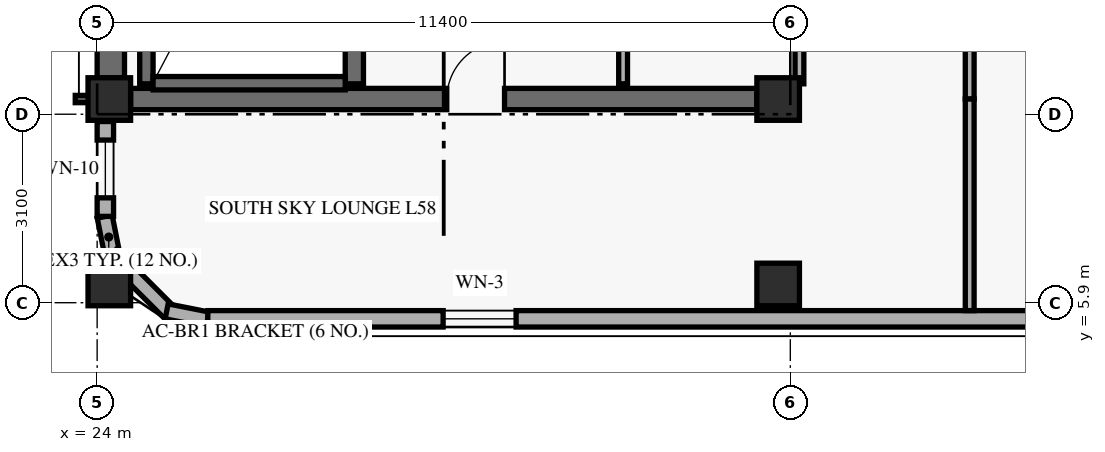
"""IFC4 building model, lengths in metres.
Left out: names, types, materials, properties, quantities, classifications, styles, units other than length and angle.
Written with IfcOpenShell. Run it as: python <this file> out.ifc"""

import sys

from ifc_helpers import new_model, si_unit, direction, frame, frame_2d, origin, origin_2d, place, context, subcontext, project, spatial, rectangle, extrude, element, fill, save


model = new_model("IFC4")
c1 = context("Model", 3, precision=1e-05, world=origin(), true_north=direction((0.0, 1.0)))
c2 = subcontext(c1, "Body", "Model", "MODEL_VIEW")
j1 = project(units=[si_unit("LENGTHUNIT", "METRE"), si_unit("PLANEANGLEUNIT", "RADIAN")], contexts=[c1])
p1 = place(None, origin())
s1 = spatial("IfcSite", under=j1, at=p1, CompositionType="ELEMENT")
p2 = place(p1, origin())
s2 = spatial("IfcBuilding", under=s1, at=p2, CompositionType="ELEMENT")
p3 = place(p2, frame((0.0, 0.0, 223.8)))
s3 = spatial("IfcBuildingStorey", under=s2, at=p3, CompositionType="ELEMENT", Elevation=223.8)
p4 = place(p3, frame((24.225, 9.6, 0.0), z_axis=(0.0, 0.0, 1.0), x_axis=(0.0, 1.0, 0.0)))
e1 = element("IfcWall", 1, at=p4, inside=s3, PredefinedType="SHEAR", context=c2, shape_type="SweptSolid", body=[
    extrude(rectangle(XDim=7.6, YDim=0.45, at=frame_2d((3.8, 0.0))), origin(), (0.0, 0.0, 1.0), 2.821),
])
p5 = place(p3, frame((24.55, 9.25, 0.0), z_axis=(0.0, 0.0, 1.0), x_axis=(1.0, 0.0, 0.0)))
e2 = element("IfcWall", 2, at=p5, inside=s3, PredefinedType="SHEAR", context=c2, shape_type="SweptSolid", body=[
    extrude(rectangle(XDim=10.3, YDim=0.35, at=frame_2d((5.15, 0.0))), origin(), (0.0, 0.0, 1.0), 3.36),
])
p6 = place(p5, frame((5.2, 0.0, 0.0)))
e3 = element("IfcOpeningElement", 3, at=p6, cuts=e2, PredefinedType="OPENING", context=c2, shape_type="SweptSolid", body=[
    extrude(rectangle(XDim=0.95, YDim=2.15, at=frame_2d((0.475, 1.075))), frame((0.0, 0.185, 0.0), z_axis=(0.0, -1.0, 0.0), x_axis=(1.0, 0.0, 0.0)), (0.0, 0.0, 1.0), 0.37),
])
p7 = place(p3, frame((24.81, 9.5, 0.0), z_axis=(0.0, 0.0, 1.0), x_axis=(0.0, 1.0, 0.0)))
e4 = element("IfcWall", 4, at=p7, inside=s3, PredefinedType="SHEAR", context=c2, shape_type="SweptSolid", body=[
    extrude(rectangle(XDim=7.76, YDim=0.22, at=frame_2d((3.88, 0.0))), origin(), (0.0, 0.0, 1.0), 3.36),
])
p8 = place(p3, frame((28.23, 9.5, 0.0), z_axis=(0.0, 0.0, 1.0), x_axis=(0.0, 1.0, 0.0)))
e5 = element("IfcWall", 5, at=p8, inside=s3, PredefinedType="SHEAR", context=c2, shape_type="SweptSolid", body=[
    extrude(rectangle(XDim=7.76, YDim=0.3, at=frame_2d((3.88, 0.0))), origin(), (0.0, 0.0, 1.0), 3.36),
])
p9 = place(p3, frame((24.92, 9.51, 0.0), z_axis=(0.0, 0.0, 1.0), x_axis=(1.0, 0.0, 0.0)))
e6 = element("IfcWall", 6, at=p9, inside=s3, PredefinedType="SHEAR", context=c2, shape_type="SweptSolid", body=[
    extrude(rectangle(XDim=3.16, YDim=0.22, at=frame_2d((1.58, 0.0))), origin(), (0.0, 0.0, 1.0), 3.36),
])
for number, where, z_axis, x_axis in (
    (7, (24.2, 6.2, 0.0), (0.0, 0.0, 1.0), (1.0, 0.0, 0.0)),
    (8, (24.2, 9.25, 0.0), (0.0, 0.0, 1.0), (1.0, 0.0, 0.0)),
    (9, (35.2, 6.2, 0.0), (0.0, 0.0, 1.0), (1.0, 0.0, 0.0)),
    (10, (35.2, 9.25, 0.0), (0.0, 0.0, 1.0), (1.0, 0.0, 0.0)),
):
    element("IfcColumn", number, at=place(p3, frame(where, z_axis=z_axis, x_axis=x_axis)), inside=s3, PredefinedType="COLUMN", context=c2, shape_type="SweptSolid", body=[
        extrude(rectangle(XDim=0.7, YDim=0.7, at=origin_2d()), origin(), (0.0, 0.0, 1.0), 3.6),
    ])
p10 = place(p3, frame((24.124, 7.316, 0.0), z_axis=(0.0, 0.0, 1.0), x_axis=(0.194952956674, -0.980812594069, 0.0)))
e11 = element("IfcWall", 11, at=p10, inside=s3, PredefinedType="SOLIDWALL", context=c2, shape_type="SweptSolid", body=[
    extrude(rectangle(XDim=0.686, YDim=0.25, at=frame_2d((0.343, 0.0))), origin(), (0.0, 0.0, 1.0), 2.803),
])
p11 = place(p3, frame((24.231, 6.694, 0.0), z_axis=(0.0, 0.0, 1.0), x_axis=(0.707106781187, -0.707106781187, 0.0)))
e12 = element("IfcWall", 12, at=p11, inside=s3, PredefinedType="SOLIDWALL", context=c2, shape_type="SweptSolid", body=[
    extrude(rectangle(XDim=1.362, YDim=0.25, at=frame_2d((0.681, 0.0))), origin(), (0.0, 0.0, 1.0), 2.803),
])
p12 = place(p3, frame((25.143, 5.758, 0.0), z_axis=(0.0, 0.0, 1.0), x_axis=(0.980812594069, -0.194952956674, 0.0)))
e13 = element("IfcWall", 13, at=p12, inside=s3, PredefinedType="SOLIDWALL", context=c2, shape_type="SweptSolid", body=[
    extrude(rectangle(XDim=0.686, YDim=0.25, at=frame_2d((0.343, 0.0))), origin(), (0.0, 0.0, 1.0), 3.36),
])
p13 = place(p3, frame((25.82, 5.635, 0.0), z_axis=(0.0, 0.0, 1.0), x_axis=(1.0, 0.0, 0.0)))
e14 = element("IfcWall", 14, at=p13, inside=s3, PredefinedType="SOLIDWALL", context=c2, shape_type="SweptSolid", body=[
    extrude(rectangle(XDim=32.96, YDim=0.27, at=frame_2d((16.48, 0.0))), origin(), (0.0, 0.0, 1.0), 3.36),
])
p14 = place(p13, frame((3.87, 0.0, 0.85)))
e15 = element("IfcOpeningElement", 15, at=p14, cuts=e14, PredefinedType="OPENING", context=c2, shape_type="SweptSolid", body=[
    extrude(rectangle(XDim=1.2, YDim=1.5, at=frame_2d((0.6, 0.75))), frame((0.0, 0.145, 0.0), z_axis=(0.0, -1.0, 0.0), x_axis=(1.0, 0.0, 0.0)), (0.0, 0.0, 1.0), 0.29),
])
p15 = place(p13, frame((16.451, 0.0, 0.85)))
e16 = element("IfcOpeningElement", 16, at=p15, cuts=e14, PredefinedType="OPENING", context=c2, shape_type="SweptSolid", body=[
    extrude(rectangle(XDim=1.2, YDim=1.5, at=frame_2d((0.6, 0.75))), frame((0.0, 0.145, 0.0), z_axis=(0.0, -1.0, 0.0), x_axis=(1.0, 0.0, 0.0)), (0.0, 0.0, 1.0), 0.29),
])
p16 = place(p13, frame((27.747, 0.0, 0.85)))
e17 = element("IfcOpeningElement", 17, at=p16, cuts=e14, PredefinedType="OPENING", context=c2, shape_type="SweptSolid", body=[
    extrude(rectangle(XDim=1.2, YDim=1.5, at=frame_2d((0.6, 0.75))), frame((0.0, 0.145, 0.0), z_axis=(0.0, -1.0, 0.0), x_axis=(1.0, 0.0, 0.0)), (0.0, 0.0, 1.0), 0.29),
])
p17 = place(p13, frame((31.061, 0.0, 0.85)))
e18 = element("IfcOpeningElement", 18, at=p17, cuts=e14, PredefinedType="OPENING", context=c2, shape_type="SweptSolid", body=[
    extrude(rectangle(XDim=1.2, YDim=1.5, at=frame_2d((0.6, 0.75))), frame((0.0, 0.145, 0.0), z_axis=(0.0, -1.0, 0.0), x_axis=(1.0, 0.0, 0.0)), (0.0, 0.0, 1.0), 0.29),
])
p18 = place(p3, frame((24.135, 7.32, 0.0), z_axis=(0.0, 0.0, 1.0), x_axis=(0.0, 1.0, 0.0)))
e19 = element("IfcWall", 19, at=p18, inside=s3, PredefinedType="SOLIDWALL", context=c2, shape_type="SweptSolid", body=[
    extrude(rectangle(XDim=1.56, YDim=0.27, at=frame_2d((0.78, 0.0))), origin(), (0.0, 0.0, 1.0), 2.803),
])
p19 = place(p18, frame((0.305, 0.0, 0.85)))
e20 = element("IfcOpeningElement", 20, at=p19, cuts=e19, PredefinedType="OPENING", context=c2, shape_type="SweptSolid", body=[
    extrude(rectangle(XDim=0.95, YDim=1.5, at=frame_2d((0.475, 0.75))), frame((0.0, 0.145, 0.0), z_axis=(0.0, -1.0, 0.0), x_axis=(1.0, 0.0, 0.0)), (0.0, 0.0, 1.0), 0.29),
])
p20 = place(p3, frame((32.65, 9.5, 0.0), z_axis=(0.0, 0.0, 1.0), x_axis=(0.0, 1.0, 0.0)))
e21 = element("IfcWall", 21, at=p20, inside=s3, PredefinedType="PARTITIONING", context=c2, shape_type="SweptSolid", body=[
    extrude(rectangle(XDim=6.08, YDim=0.145, at=frame_2d((3.04, 0.0))), origin(), (0.0, 0.0, 1.0), 3.36),
])
p21 = place(p3, frame((38.35, 9.25, 0.0), z_axis=(0.0, 0.0, 1.0), x_axis=(0.0, 1.0, 0.0)))
e22 = element("IfcWall", 22, at=p21, inside=s3, PredefinedType="PARTITIONING", context=c2, shape_type="SweptSolid", body=[
    extrude(rectangle(XDim=6.258, YDim=0.145, at=frame_2d((3.129, 0.0))), origin(), (0.0, 0.0, 1.0), 2.803),
])
p22 = place(p3, frame((35.55, 9.5, 0.0), z_axis=(0.0, 0.0, 1.0), x_axis=(0.0, 1.0, 0.0)))
e23 = element("IfcWall", 23, at=p22, inside=s3, PredefinedType="PARTITIONING", context=c2, shape_type="SweptSolid", body=[
    extrude(rectangle(XDim=6.008, YDim=0.145, at=frame_2d((3.004, 0.0))), origin(), (0.0, 0.0, 1.0), 3.039),
])
p23 = place(p3, frame((38.35, 5.77, 0.0), z_axis=(0.0, 0.0, 1.0), x_axis=(0.0, 1.0, 0.0)))
e24 = element("IfcWall", 24, at=p23, inside=s3, PredefinedType="PARTITIONING", context=c2, shape_type="SweptSolid", body=[
    extrude(rectangle(XDim=3.48, YDim=0.145, at=frame_2d((1.74, 0.0))), origin(), (0.0, 0.0, 1.0), 2.803),
])
p24 = place(p14, origin())
e25 = element("IfcWindow", 25, at=p24, inside=s3, PartitioningType="SINGLE_PANEL", PredefinedType="WINDOW", context=c2, shape_type="SweptSolid", body=[
    extrude(rectangle(XDim=1.2, YDim=1.5, at=frame_2d((0.6, 0.75))), frame((0.0, 0.03, 0.0), z_axis=(0.0, -1.0, 0.0), x_axis=(1.0, 0.0, 0.0)), (0.0, 0.0, 1.0), 0.06),
])
fill(e15, e25)
p25 = place(p19, origin())
e26 = element("IfcWindow", 26, at=p25, inside=s3, PartitioningType="SINGLE_PANEL", PredefinedType="WINDOW", context=c2, shape_type="SweptSolid", body=[
    extrude(rectangle(XDim=0.95, YDim=1.5, at=frame_2d((0.475, 0.75))), frame((0.0, 0.03, 0.0), z_axis=(0.0, -1.0, 0.0), x_axis=(1.0, 0.0, 0.0)), (0.0, 0.0, 1.0), 0.06),
])
fill(e20, e26)
p26 = place(p6, frame((0.95, 0.0, 0.0), z_axis=(0.0, 0.0, 1.0), x_axis=(-1.0, 0.0, 0.0)))
e27 = element("IfcDoor", 27, at=p26, inside=s3, OperationType="SINGLE_SWING_LEFT", PredefinedType="DOOR", context=c2, shape_type="SweptSolid", body=[
    extrude(rectangle(XDim=0.95, YDim=2.15, at=frame_2d((0.475, 1.075))), frame((0.0, 0.025, 0.0), z_axis=(0.0, -1.0, 0.0), x_axis=(1.0, 0.0, 0.0)), (0.0, 0.0, 1.0), 0.05),
])
fill(e3, e27)
save(model, sys.argv[1])
